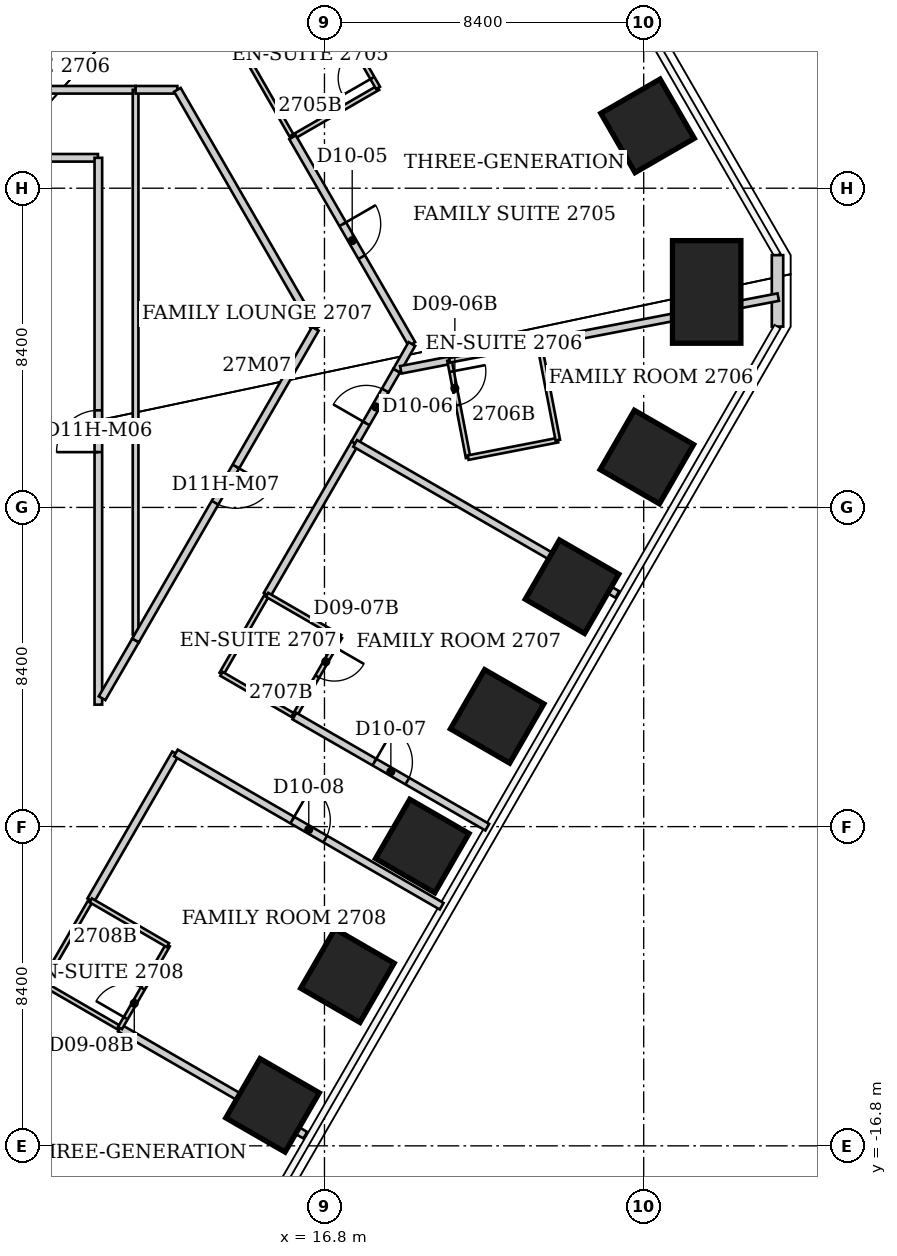
"""IFC4 building model, lengths in metres.
Left out: names, types, materials, properties, quantities, classifications, styles, units other than length and angle.
Written with IfcOpenShell. Run it as: python <this file> out.ifc"""

import sys

from ifc_helpers import new_model, si_unit, direction, frame, frame_2d, origin, origin_2d, place, context, subcontext, project, spatial, rectangle, extrude, element, fill, save


model = new_model("IFC4")
c1 = context("Model", 3, precision=1e-05, world=origin(), true_north=direction((0.0, 1.0)))
c2 = subcontext(c1, "Body", "Model", "MODEL_VIEW")
j1 = project(units=[si_unit("LENGTHUNIT", "METRE"), si_unit("PLANEANGLEUNIT", "RADIAN")], contexts=[c1])
p1 = place(None, origin())
s1 = spatial("IfcSite", under=j1, at=p1, CompositionType="ELEMENT")
p2 = place(p1, origin())
s2 = spatial("IfcBuilding", under=s1, at=p2, CompositionType="ELEMENT")
p3 = place(p2, frame((0.0, 0.0, 112.0)))
s3 = spatial("IfcBuildingStorey", under=s2, at=p3, CompositionType="ELEMENT", Elevation=112.0)
p4 = place(p3, frame((25.302, 10.041, 0.0), z_axis=(0.0, 0.0, 1.0), x_axis=(0.866025403784, 0.5, 0.0)))
e1 = element("IfcColumn", 1, at=p4, inside=s3, PredefinedType="COLUMN", context=c2, shape_type="SweptSolid", body=[
    extrude(rectangle(XDim=1.8, YDim=1.8, at=origin_2d()), origin(), (0.0, 0.0, 1.0), 3.8),
])
p5 = place(p3, frame((26.857, 5.67, 0.0), z_axis=(0.0, 0.0, 1.0), x_axis=(1.0, 0.0, 0.0)))
e2 = element("IfcColumn", 2, at=p5, inside=s3, PredefinedType="COLUMN", context=c2, shape_type="SweptSolid", body=[
    extrude(rectangle(XDim=1.8, YDim=2.7, at=origin_2d()), origin(), (0.0, 0.0, 1.0), 3.8),
])
for number, where, z_axis, x_axis in (
    (3, (25.284, 1.325, 0.0), (0.0, 0.0, 1.0), (0.866, -0.5, 0.0)),
    (4, (23.314, -2.087, 0.0), (0.0, 0.0, 1.0), (0.866, -0.5, 0.0)),
    (5, (21.344, -5.499, 0.0), (0.0, 0.0, 1.0), (0.866, -0.5, 0.0)),
    (6, (19.374, -8.911, 0.0), (0.0, 0.0, 1.0), (0.866, -0.5, 0.0)),
    (7, (17.404, -12.323, 0.0), (0.0, 0.0, 1.0), (0.866, -0.5, 0.0)),
    (8, (15.434, -15.735, 0.0), (0.0, 0.0, 1.0), (0.866, -0.5, 0.0)),
):
    element("IfcColumn", number, at=place(p3, frame(where, z_axis=z_axis, x_axis=x_axis)), inside=s3, PredefinedType="COLUMN", context=c2, shape_type="SweptSolid", body=[
        extrude(rectangle(XDim=1.8, YDim=1.8, at=origin_2d()), origin(), (0.0, 0.0, 1.0), 3.8),
    ])
p6 = place(p3, frame((28.721, 6.638, 0.0), z_axis=(0.0, 0.0, 1.0), x_axis=(0.0, -1.0, 0.0)))
e9 = element("IfcWall", 9, at=p6, inside=s3, PredefinedType="SOLIDWALL", context=c2, shape_type="SweptSolid", body=[
    extrude(rectangle(XDim=1.88, YDim=0.3, at=frame_2d((0.94, 0.0))), origin(), (0.0, 0.0, 1.0), 3.64),
])
p7 = place(p3, frame((7.1, 10.99, 0.0), z_axis=(0.0, 0.0, 1.0), x_axis=(1.0, 0.0, 0.0)))
e10 = element("IfcWall", 10, at=p7, inside=s3, PredefinedType="PARTITIONING", context=c2, shape_type="SweptSolid", body=[
    extrude(rectangle(XDim=4.73, YDim=0.2, at=frame_2d((2.365, 0.0))), origin(), (0.0, 0.0, 1.0), 3.64),
])
p8 = place(p3, frame((9.387, -12.528, 0.0), z_axis=(0.0, 0.0, 1.0), x_axis=(0.499797743474, 0.866142145158, 0.0)))
e11 = element("IfcWall", 11, at=p8, inside=s3, PredefinedType="PARTITIONING", context=c2, shape_type="SweptSolid", body=[
    extrude(rectangle(XDim=2.526, YDim=0.12, at=frame_2d((1.263, 0.0))), origin(), (0.0, 0.0, 1.0), 3.64),
])
p9 = place(p3, frame((9.39, -12.53, 0.0), z_axis=(0.0, 0.0, 1.0), x_axis=(0.865459574701, -0.500978766574, 0.0)))
e12 = element("IfcWall", 12, at=p9, inside=s3, PredefinedType="PARTITIONING", context=c2, shape_type="SweptSolid", body=[
    extrude(rectangle(XDim=2.343, YDim=0.12, at=frame_2d((1.171, 0.0))), origin(), (0.0, 0.0, 1.0), 3.64),
])
p10 = place(p3, frame((10.65, -10.34, 0.0), z_axis=(0.0, 0.0, 1.0), x_axis=(0.499990639951, 0.866030807744, 0.0)))
e13 = element("IfcWall", 13, at=p10, inside=s3, PredefinedType="PARTITIONING", context=c2, shape_type="SweptSolid", body=[
    extrude(rectangle(XDim=4.465, YDim=0.2, at=frame_2d((2.233, 0.0))), origin(), (0.0, 0.0, 1.0), 3.64),
])
p11 = place(p3, frame((10.84, 9.2, 0.0), z_axis=(0.0, 0.0, 1.0), x_axis=(-1.0, 0.0, 0.0)))
e14 = element("IfcWall", 14, at=p11, inside=s3, PredefinedType="PARTITIONING", context=c2, shape_type="SweptSolid", body=[
    extrude(rectangle(XDim=3.74, YDim=0.2, at=frame_2d((1.87, 0.0))), origin(), (0.0, 0.0, 1.0), 3.64),
])
p12 = place(p3, frame((10.85, -5.19, 0.0), z_axis=(0.0, 0.0, 1.0), x_axis=(0.0, 1.0, 0.0)))
e15 = element("IfcWall", 15, at=p12, inside=s3, PredefinedType="PARTITIONING", context=c2, shape_type="SweptSolid", body=[
    extrude(rectangle(XDim=14.39, YDim=0.2, at=frame_2d((7.195, 0.0))), origin(), (0.0, 0.0, 1.0), 3.64),
])
p13 = place(p12, frame((6.645, 0.0, 0.0)))
e16 = element("IfcOpeningElement", 16, at=p13, cuts=e15, PredefinedType="OPENING", context=c2, shape_type="SweptSolid", body=[
    extrude(rectangle(XDim=1.1, YDim=2.2, at=frame_2d((0.55, 1.1))), frame((0.0, 0.1, 0.0), z_axis=(0.0, -1.0, 0.0), x_axis=(1.0, 0.0, 0.0)), (0.0, 0.0, 1.0), 0.2),
])
p14 = place(p3, frame((11.418, -13.704, 0.0), z_axis=(0.0, 0.0, 1.0), x_axis=(0.866055675731, -0.499947563785, 0.0)))
e17 = element("IfcWall", 17, at=p14, inside=s3, PredefinedType="PARTITIONING", context=c2, shape_type="SweptSolid", body=[
    extrude(rectangle(XDim=5.633, YDim=0.2, at=frame_2d((2.816, 0.0))), origin(), (0.0, 0.0, 1.0), 3.64),
])
p15 = place(p3, frame((11.42, -13.7, 0.0), z_axis=(0.0, 0.0, 1.0), x_axis=(0.500424596343, 0.865780124151, 0.0)))
e18 = element("IfcWall", 18, at=p15, inside=s3, PredefinedType="PARTITIONING", context=c2, shape_type="SweptSolid", body=[
    extrude(rectangle(XDim=2.518, YDim=0.12, at=frame_2d((1.259, 0.0))), origin(), (0.0, 0.0, 1.0), 3.64),
])
p16 = place(p15, frame((0.3, 0.0, 0.0)))
e19 = element("IfcOpeningElement", 19, at=p16, cuts=e18, PredefinedType="OPENING", context=c2, shape_type="SweptSolid", body=[
    extrude(rectangle(XDim=0.9, YDim=2.03, at=frame_2d((0.45, 1.015))), frame((0.0, 0.06, 0.0), z_axis=(0.0, -1.0, 0.0), x_axis=(1.0, 0.0, 0.0)), (0.0, 0.0, 1.0), 0.12),
])
p17 = place(p3, frame((11.83, -3.5, 0.0), z_axis=(0.0, 0.0, 1.0), x_axis=(-0.501720167394, -0.865029984237, 0.0)))
e20 = element("IfcWall", 20, at=p17, inside=s3, PredefinedType="PARTITIONING", context=c2, shape_type="SweptSolid", body=[
    extrude(rectangle(XDim=1.759, YDim=0.2, at=frame_2d((0.879, 0.0))), origin(), (0.0, 0.0, 1.0), 3.64),
])
p18 = place(p3, frame((11.83, 10.99, 0.0), z_axis=(0.0, 0.0, 1.0), x_axis=(0.0, -1.0, 0.0)))
e21 = element("IfcWall", 21, at=p18, inside=s3, PredefinedType="PARTITIONING", context=c2, shape_type="SweptSolid", body=[
    extrude(rectangle(XDim=14.335, YDim=0.15, at=frame_2d((7.167, 0.0))), origin(), (0.0, 0.0, 1.0), 3.64),
])
p19 = place(p3, frame((11.83, 10.99, 0.0), z_axis=(0.0, 0.0, 1.0), x_axis=(1.0, 0.0, 0.0)))
e22 = element("IfcWall", 22, at=p19, inside=s3, PredefinedType="PARTITIONING", context=c2, shape_type="SweptSolid", body=[
    extrude(rectangle(XDim=1.1, YDim=0.2, at=frame_2d((0.55, 0.0))), origin(), (0.0, 0.0, 1.0), 3.64),
])
p20 = place(p3, frame((12.68, -11.52, 0.0), z_axis=(0.0, 0.0, 1.0), x_axis=(-0.864539759309, 0.502564428282, 0.0)))
e23 = element("IfcWall", 23, at=p20, inside=s3, PredefinedType="PARTITIONING", context=c2, shape_type="SweptSolid", body=[
    extrude(rectangle(XDim=2.348, YDim=0.12, at=frame_2d((1.174, 0.0))), origin(), (0.0, 0.0, 1.0), 3.64),
])
p21 = place(p3, frame((12.89, -6.46, 0.0), z_axis=(0.0, 0.0, 1.0), x_axis=(0.866181559118, -0.499729433437, 0.0)))
e24 = element("IfcWall", 24, at=p21, inside=s3, PredefinedType="PARTITIONING", context=c2, shape_type="SweptSolid", body=[
    extrude(rectangle(XDim=8.075, YDim=0.2, at=frame_2d((4.037, 0.0))), origin(), (0.0, 0.0, 1.0), 3.64),
])
p22 = place(p21, frame((3.537, 0.0, 0.0)))
e25 = element("IfcOpeningElement", 25, at=p22, cuts=e24, PredefinedType="OPENING", context=c2, shape_type="SweptSolid", body=[
    extrude(rectangle(XDim=1.0, YDim=2.13, at=frame_2d((0.5, 1.065))), frame((0.0, 0.1, 0.0), z_axis=(0.0, -1.0, 0.0), x_axis=(1.0, 0.0, 0.0)), (0.0, 0.0, 1.0), 0.2),
])
p23 = place(p3, frame((12.93, 10.99, 0.0), z_axis=(0.0, 0.0, 1.0), x_axis=(0.4998524389, -0.866110581465, 0.0)))
e26 = element("IfcWall", 26, at=p23, inside=s3, PredefinedType="PARTITIONING", context=c2, shape_type="SweptSolid", body=[
    extrude(rectangle(XDim=7.262, YDim=0.2, at=frame_2d((3.631, 0.0))), origin(), (0.0, 0.0, 1.0), 3.64),
])
p24 = place(p3, frame((14.09, -4.38, 0.0), z_axis=(0.0, 0.0, 1.0), x_axis=(0.499737123639, 0.866177122335, 0.0)))
e27 = element("IfcWall", 27, at=p24, inside=s3, PredefinedType="PARTITIONING", context=c2, shape_type="SweptSolid", body=[
    extrude(rectangle(XDim=2.401, YDim=0.12, at=frame_2d((1.201, 0.0))), origin(), (0.0, 0.0, 1.0), 3.64),
])
p25 = place(p3, frame((14.09, -4.38, 0.0), z_axis=(0.0, 0.0, 1.0), x_axis=(0.865705017107, -0.500554515868, 0.0)))
e28 = element("IfcWall", 28, at=p25, inside=s3, PredefinedType="PARTITIONING", context=c2, shape_type="SweptSolid", body=[
    extrude(rectangle(XDim=2.218, YDim=0.12, at=frame_2d((1.109, 0.0))), origin(), (0.0, 0.0, 1.0), 3.64),
])
p26 = place(p3, frame((14.64, 12.04, 0.0), z_axis=(0.0, 0.0, 1.0), x_axis=(0.497773911185, -0.867306827682, 0.0)))
e29 = element("IfcWall", 29, at=p26, inside=s3, PredefinedType="PARTITIONING", context=c2, shape_type="SweptSolid", body=[
    extrude(rectangle(XDim=2.652, YDim=0.12, at=frame_2d((1.326, 0.0))), origin(), (0.0, 0.0, 1.0), 3.64),
])
p27 = place(p3, frame((14.64, 12.04, 0.0), z_axis=(0.0, 0.0, 1.0), x_axis=(0.865880446098, 0.50025099007, 0.0)))
e30 = element("IfcWall", 30, at=p27, inside=s3, PredefinedType="PARTITIONING", context=c2, shape_type="SweptSolid", body=[
    extrude(rectangle(XDim=2.599, YDim=0.12, at=frame_2d((1.299, 0.0))), origin(), (0.0, 0.0, 1.0), 3.64),
])
p28 = place(p3, frame((15.29, -2.3, 0.0), z_axis=(0.0, 0.0, 1.0), x_axis=(0.501046707413, 0.865420242998, 0.0)))
e31 = element("IfcWall", 31, at=p28, inside=s3, PredefinedType="PARTITIONING", context=c2, shape_type="SweptSolid", body=[
    extrude(rectangle(XDim=4.61, YDim=0.2, at=frame_2d((2.305, 0.0))), origin(), (0.0, 0.0, 1.0), 3.64),
])
p29 = place(p3, frame((15.96, 9.74, 0.0), z_axis=(0.0, 0.0, 1.0), x_axis=(0.865856933682, 0.500291685314, 0.0)))
e32 = element("IfcWall", 32, at=p29, inside=s3, PredefinedType="PARTITIONING", context=c2, shape_type="SweptSolid", body=[
    extrude(rectangle(XDim=2.599, YDim=0.12, at=frame_2d((1.299, 0.0))), origin(), (0.0, 0.0, 1.0), 3.64),
])
p30 = place(p3, frame((15.96, 9.74, 0.0), z_axis=(0.0, 0.0, 1.0), x_axis=(0.499926574701, -0.86606779175, 0.0)))
e33 = element("IfcWall", 33, at=p30, inside=s3, PredefinedType="PARTITIONING", context=c2, shape_type="SweptSolid", body=[
    extrude(rectangle(XDim=6.281, YDim=0.2, at=frame_2d((3.141, 0.0))), origin(), (0.0, 0.0, 1.0), 3.64),
])
p31 = place(p30, frame((2.641, 0.0, 0.0)))
e34 = element("IfcOpeningElement", 34, at=p31, cuts=e33, PredefinedType="OPENING", context=c2, shape_type="SweptSolid", body=[
    extrude(rectangle(XDim=1.0, YDim=2.13, at=frame_2d((0.5, 1.065))), frame((0.0, 0.1, 0.0), z_axis=(0.0, -1.0, 0.0), x_axis=(1.0, 0.0, 0.0)), (0.0, 0.0, 1.0), 0.2),
])
p32 = place(p3, frame((16.01, -5.49, 0.0), z_axis=(0.0, 0.0, 1.0), x_axis=(0.499693115345, 0.866202511239, 0.0)))
e35 = element("IfcWall", 35, at=p32, inside=s3, PredefinedType="PARTITIONING", context=c2, shape_type="SweptSolid", body=[
    extrude(rectangle(XDim=2.401, YDim=0.12, at=frame_2d((1.201, 0.0))), origin(), (0.0, 0.0, 1.0), 3.64),
])
p33 = place(p32, frame((1.201, 0.0, 0.0)))
e36 = element("IfcOpeningElement", 36, at=p33, cuts=e35, PredefinedType="OPENING", context=c2, shape_type="SweptSolid", body=[
    extrude(rectangle(XDim=0.9, YDim=2.03, at=frame_2d((0.45, 1.015))), frame((0.0, 0.06, 0.0), z_axis=(0.0, -1.0, 0.0), x_axis=(1.0, 0.0, 0.0)), (0.0, 0.0, 1.0), 0.12),
])
p34 = place(p3, frame((16.01, -5.49, 0.0), z_axis=(0.0, 0.0, 1.0), x_axis=(0.866351401603, -0.499434929635, 0.0)))
e37 = element("IfcWall", 37, at=p34, inside=s3, PredefinedType="PARTITIONING", context=c2, shape_type="SweptSolid", body=[
    extrude(rectangle(XDim=5.857, YDim=0.2, at=frame_2d((2.928, 0.0))), origin(), (0.0, 0.0, 1.0), 3.64),
])
p35 = place(p34, frame((2.428, 0.0, 0.0)))
e38 = element("IfcOpeningElement", 38, at=p35, cuts=e37, PredefinedType="OPENING", context=c2, shape_type="SweptSolid", body=[
    extrude(rectangle(XDim=1.0, YDim=2.13, at=frame_2d((0.5, 1.065))), frame((0.0, 0.1, 0.0), z_axis=(0.0, -1.0, 0.0), x_axis=(1.0, 0.0, 0.0)), (0.0, 0.0, 1.0), 0.2),
])
p36 = place(p3, frame((16.56, 4.7, 0.0), z_axis=(0.0, 0.0, 1.0), x_axis=(-0.499662169849, -0.866220362276, 0.0)))
e39 = element("IfcWall", 39, at=p36, inside=s3, PredefinedType="PARTITIONING", context=c2, shape_type="SweptSolid", body=[
    extrude(rectangle(XDim=9.466, YDim=0.2, at=frame_2d((4.733, 0.0))), origin(), (0.0, 0.0, 1.0), 3.64),
])
p37 = place(p36, frame((4.183, 0.0, 0.0)))
e40 = element("IfcOpeningElement", 40, at=p37, cuts=e39, PredefinedType="OPENING", context=c2, shape_type="SweptSolid", body=[
    extrude(rectangle(XDim=1.1, YDim=2.2, at=frame_2d((0.55, 1.1))), frame((0.0, 0.1, 0.0), z_axis=(0.0, -1.0, 0.0), x_axis=(1.0, 0.0, 0.0)), (0.0, 0.0, 1.0), 0.2),
])
p38 = place(p3, frame((17.21, -3.41, 0.0), z_axis=(0.0, 0.0, 1.0), x_axis=(-0.86575271903, 0.500472006703, 0.0)))
e41 = element("IfcWall", 41, at=p38, inside=s3, PredefinedType="PARTITIONING", context=c2, shape_type="SweptSolid", body=[
    extrude(rectangle(XDim=2.218, YDim=0.12, at=frame_2d((1.109, 0.0))), origin(), (0.0, 0.0, 1.0), 3.64),
])
p39 = place(p3, frame((17.6, 1.69, 0.0), z_axis=(0.0, 0.0, 1.0), x_axis=(0.498987132006, 0.866609394187, 0.0)))
e42 = element("IfcWall", 42, at=p39, inside=s3, PredefinedType="PARTITIONING", context=c2, shape_type="SweptSolid", body=[
    extrude(rectangle(XDim=2.204, YDim=0.2, at=frame_2d((1.102, 0.0))), origin(), (0.0, 0.0, 1.0), 3.64),
])
p40 = place(p39, frame((0.602, 0.0, 0.0)))
e43 = element("IfcOpeningElement", 43, at=p40, cuts=e42, PredefinedType="OPENING", context=c2, shape_type="SweptSolid", body=[
    extrude(rectangle(XDim=1.0, YDim=2.13, at=frame_2d((0.5, 1.065))), frame((0.0, 0.1, 0.0), z_axis=(0.0, -1.0, 0.0), x_axis=(1.0, 0.0, 0.0)), (0.0, 0.0, 1.0), 0.2),
])
p41 = place(p3, frame((18.21, 11.04, 0.0), z_axis=(0.0, 0.0, 1.0), x_axis=(-0.497773911185, 0.867306827682, 0.0)))
e44 = element("IfcWall", 44, at=p41, inside=s3, PredefinedType="PARTITIONING", context=c2, shape_type="SweptSolid", body=[
    extrude(rectangle(XDim=2.652, YDim=0.12, at=frame_2d((1.326, 0.0))), origin(), (0.0, 0.0, 1.0), 3.64),
])
p42 = place(p41, frame((0.3, 0.0, 0.0)))
e45 = element("IfcOpeningElement", 45, at=p42, cuts=e44, PredefinedType="OPENING", context=c2, shape_type="SweptSolid", body=[
    extrude(rectangle(XDim=0.9, YDim=2.03, at=frame_2d((0.45, 1.015))), frame((0.0, 0.06, 0.0), z_axis=(0.0, -1.0, 0.0), x_axis=(1.0, 0.0, 0.0)), (0.0, 0.0, 1.0), 0.12),
])
p43 = place(p3, frame((18.7, 3.6, 0.0), z_axis=(0.0, 0.0, 1.0), x_axis=(0.496301979961, 0.868149955185, 0.0)))
e46 = element("IfcWall", 46, at=p43, inside=s3, PredefinedType="PARTITIONING", context=c2, shape_type="SweptSolid", body=[
    extrude(rectangle(XDim=0.806, YDim=0.2, at=frame_2d((0.403, 0.0))), origin(), (0.0, 0.0, 1.0), 3.64),
])
p44 = place(p3, frame((18.808, 3.621, 0.0), z_axis=(0.0, 0.0, 1.0), x_axis=(0.981658166981, 0.190649529764, 0.0)))
e47 = element("IfcWall", 47, at=p44, inside=s3, PredefinedType="PARTITIONING", context=c2, shape_type="SweptSolid", body=[
    extrude(rectangle(XDim=1.306, YDim=0.2, at=frame_2d((0.653, 0.0))), origin(), (0.0, 0.0, 1.0), 3.64),
])
p45 = place(p3, frame((20.09, 3.87, 0.0), z_axis=(0.0, 0.0, 1.0), x_axis=(0.187985762814, -0.982171753299, 0.0)))
e48 = element("IfcWall", 48, at=p45, inside=s3, PredefinedType="PARTITIONING", context=c2, shape_type="SweptSolid", body=[
    extrude(rectangle(XDim=2.606, YDim=0.12, at=frame_2d((1.303, 0.0))), origin(), (0.0, 0.0, 1.0), 3.64),
])
p46 = place(p45, frame((0.3, 0.0, 0.0)))
e49 = element("IfcOpeningElement", 49, at=p46, cuts=e48, PredefinedType="OPENING", context=c2, shape_type="SweptSolid", body=[
    extrude(rectangle(XDim=0.9, YDim=2.03, at=frame_2d((0.45, 1.015))), frame((0.0, 0.06, 0.0), z_axis=(0.0, -1.0, 0.0), x_axis=(1.0, 0.0, 0.0)), (0.0, 0.0, 1.0), 0.12),
])
p47 = place(p3, frame((20.09, 3.87, 0.0), z_axis=(0.0, 0.0, 1.0), x_axis=(0.982497428577, 0.18627614673, 0.0)))
e50 = element("IfcWall", 50, at=p47, inside=s3, PredefinedType="PARTITIONING", context=c2, shape_type="SweptSolid", body=[
    extrude(rectangle(XDim=2.402, YDim=0.12, at=frame_2d((1.201, 0.0))), origin(), (0.0, 0.0, 1.0), 3.64),
])
p48 = place(p3, frame((20.58, 1.31, 0.0), z_axis=(0.0, 0.0, 1.0), x_axis=(0.981529676402, 0.191309943135, 0.0)))
e51 = element("IfcWall", 51, at=p48, inside=s3, PredefinedType="PARTITIONING", context=c2, shape_type="SweptSolid", body=[
    extrude(rectangle(XDim=2.404, YDim=0.12, at=frame_2d((1.202, 0.0))), origin(), (0.0, 0.0, 1.0), 3.64),
])
p49 = place(p3, frame((22.449, 4.324, 0.0), z_axis=(0.0, 0.0, 1.0), x_axis=(0.981996388644, 0.188899689492, 0.0)))
e52 = element("IfcWall", 52, at=p49, inside=s3, PredefinedType="PARTITIONING", context=c2, shape_type="SweptSolid", body=[
    extrude(rectangle(XDim=6.406, YDim=0.2, at=frame_2d((3.203, 0.0))), origin(), (0.0, 0.0, 1.0), 3.64),
])
p50 = place(p3, frame((22.94, 1.77, 0.0), z_axis=(0.0, 0.0, 1.0), x_axis=(-0.188697442844, 0.982035271802, 0.0)))
e53 = element("IfcWall", 53, at=p50, inside=s3, PredefinedType="PARTITIONING", context=c2, shape_type="SweptSolid", body=[
    extrude(rectangle(XDim=2.597, YDim=0.12, at=frame_2d((1.298, 0.0))), origin(), (0.0, 0.0, 1.0), 3.64),
])
p51 = place(p3, frame((24.506, -2.29, 0.0), z_axis=(0.0, 0.0, 1.0), x_axis=(-0.866414224119, 0.499325937884, 0.0)))
e54 = element("IfcWall", 54, at=p51, inside=s3, PredefinedType="PARTITIONING", context=c2, shape_type="SweptSolid", body=[
    extrude(rectangle(XDim=7.961, YDim=0.2, at=frame_2d((3.98, 0.0))), origin(), (0.0, 0.0, 1.0), 3.64),
])
p52 = place(p31, origin())
e55 = element("IfcDoor", 55, at=p52, inside=s3, OperationType="SINGLE_SWING_LEFT", PredefinedType="DOOR", context=c2, shape_type="SweptSolid", body=[
    extrude(rectangle(XDim=1.0, YDim=2.13, at=frame_2d((0.5, 1.065))), frame((0.0, 0.025, 0.0), z_axis=(0.0, -1.0, 0.0), x_axis=(1.0, 0.0, 0.0)), (0.0, 0.0, 1.0), 0.05),
])
fill(e34, e55)
p53 = place(p42, origin())
e56 = element("IfcDoor", 56, at=p53, inside=s3, OperationType="SINGLE_SWING_LEFT", PredefinedType="DOOR", context=c2, shape_type="SweptSolid", body=[
    extrude(rectangle(XDim=0.9, YDim=2.03, at=frame_2d((0.45, 1.015))), frame((0.0, 0.025, 0.0), z_axis=(0.0, -1.0, 0.0), x_axis=(1.0, 0.0, 0.0)), (0.0, 0.0, 1.0), 0.05),
])
fill(e45, e56)
p54 = place(p40, origin())
e57 = element("IfcDoor", 57, at=p54, inside=s3, OperationType="SINGLE_SWING_LEFT", PredefinedType="DOOR", context=c2, shape_type="SweptSolid", body=[
    extrude(rectangle(XDim=1.0, YDim=2.13, at=frame_2d((0.5, 1.065))), frame((0.0, 0.025, 0.0), z_axis=(0.0, -1.0, 0.0), x_axis=(1.0, 0.0, 0.0)), (0.0, 0.0, 1.0), 0.05),
])
fill(e43, e57)
p55 = place(p46, origin())
e58 = element("IfcDoor", 58, at=p55, inside=s3, OperationType="SINGLE_SWING_LEFT", PredefinedType="DOOR", context=c2, shape_type="SweptSolid", body=[
    extrude(rectangle(XDim=0.9, YDim=2.03, at=frame_2d((0.45, 1.015))), frame((0.0, 0.025, 0.0), z_axis=(0.0, -1.0, 0.0), x_axis=(1.0, 0.0, 0.0)), (0.0, 0.0, 1.0), 0.05),
])
fill(e49, e58)
p56 = place(p35, origin())
e59 = element("IfcDoor", 59, at=p56, inside=s3, OperationType="SINGLE_SWING_LEFT", PredefinedType="DOOR", context=c2, shape_type="SweptSolid", body=[
    extrude(rectangle(XDim=1.0, YDim=2.13, at=frame_2d((0.5, 1.065))), frame((0.0, 0.025, 0.0), z_axis=(0.0, -1.0, 0.0), x_axis=(1.0, 0.0, 0.0)), (0.0, 0.0, 1.0), 0.05),
])
fill(e38, e59)
p57 = place(p33, origin())
e60 = element("IfcDoor", 60, at=p57, inside=s3, OperationType="SINGLE_SWING_RIGHT", PredefinedType="DOOR", context=c2, shape_type="SweptSolid", body=[
    extrude(rectangle(XDim=0.9, YDim=2.03, at=frame_2d((0.45, 1.015))), frame((0.0, 0.025, 0.0), z_axis=(0.0, -1.0, 0.0), x_axis=(1.0, 0.0, 0.0)), (0.0, 0.0, 1.0), 0.05),
])
fill(e36, e60)
p58 = place(p22, origin())
e61 = element("IfcDoor", 61, at=p58, inside=s3, OperationType="SINGLE_SWING_LEFT", PredefinedType="DOOR", context=c2, shape_type="SweptSolid", body=[
    extrude(rectangle(XDim=1.0, YDim=2.13, at=frame_2d((0.5, 1.065))), frame((0.0, 0.025, 0.0), z_axis=(0.0, -1.0, 0.0), x_axis=(1.0, 0.0, 0.0)), (0.0, 0.0, 1.0), 0.05),
])
fill(e25, e61)
p59 = place(p16, origin())
e62 = element("IfcDoor", 62, at=p59, inside=s3, OperationType="SINGLE_SWING_LEFT", PredefinedType="DOOR", context=c2, shape_type="SweptSolid", body=[
    extrude(rectangle(XDim=0.9, YDim=2.03, at=frame_2d((0.45, 1.015))), frame((0.0, 0.025, 0.0), z_axis=(0.0, -1.0, 0.0), x_axis=(1.0, 0.0, 0.0)), (0.0, 0.0, 1.0), 0.05),
])
fill(e19, e62)
p60 = place(p13, origin())
e63 = element("IfcDoor", 63, at=p60, inside=s3, OperationType="SINGLE_SWING_LEFT", PredefinedType="DOOR", context=c2, shape_type="SweptSolid", body=[
    extrude(rectangle(XDim=1.1, YDim=2.2, at=frame_2d((0.55, 1.1))), frame((0.0, 0.025, 0.0), z_axis=(0.0, -1.0, 0.0), x_axis=(1.0, 0.0, 0.0)), (0.0, 0.0, 1.0), 0.05),
])
fill(e16, e63)
p61 = place(p37, origin())
e64 = element("IfcDoor", 64, at=p61, inside=s3, OperationType="SINGLE_SWING_LEFT", PredefinedType="DOOR", context=c2, shape_type="SweptSolid", body=[
    extrude(rectangle(XDim=1.1, YDim=2.2, at=frame_2d((0.55, 1.1))), frame((0.0, 0.025, 0.0), z_axis=(0.0, -1.0, 0.0), x_axis=(1.0, 0.0, 0.0)), (0.0, 0.0, 1.0), 0.05),
])
fill(e40, e64)
save(model, sys.argv[1])
